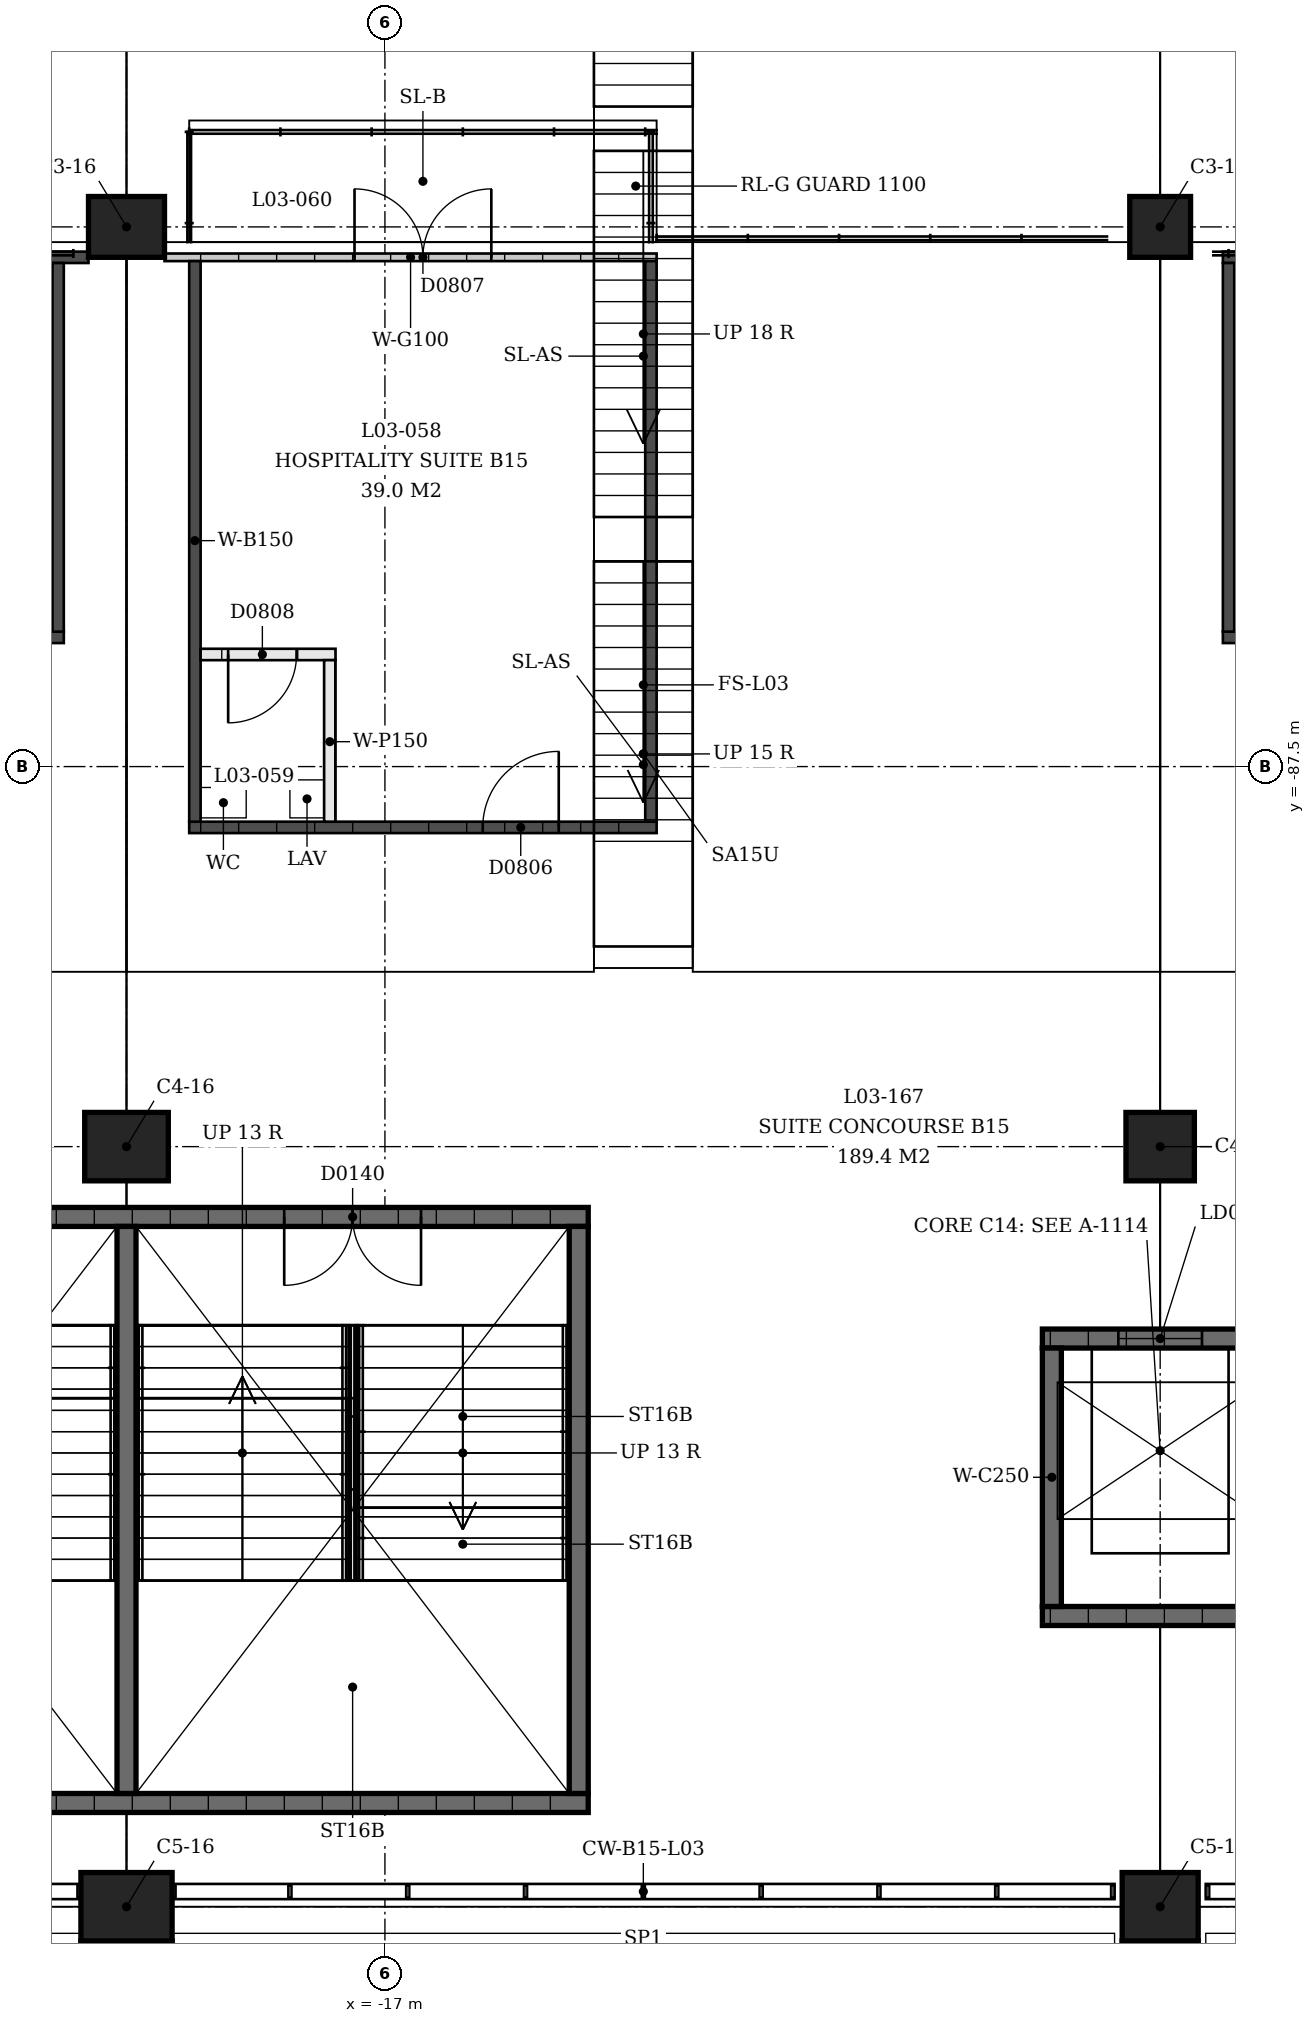
"""IFC4 building model, lengths in metres.
Left out: names, types, materials, properties, quantities, classifications, styles, units other than length and angle.
Written with IfcOpenShell. Run it as: python <this file> out.ifc"""

import sys

from ifc_helpers import new_model, si_unit, direction, frame, frame_2d, origin, origin_2d, place, context, subcontext, project, spatial, rectangle, extrude, element, fill, save


model = new_model("IFC4")
c1 = context("Model", 3, precision=1e-05, world=origin(), true_north=direction((0.0, 1.0)))
c2 = subcontext(c1, "Body", "Model", "MODEL_VIEW")
j1 = project(units=[si_unit("LENGTHUNIT", "METRE"), si_unit("PLANEANGLEUNIT", "RADIAN")], contexts=[c1])
p1 = place(None, origin())
s1 = spatial("IfcSite", under=j1, at=p1, CompositionType="ELEMENT")
p2 = place(p1, origin())
s2 = spatial("IfcBuilding", under=s1, at=p2, CompositionType="ELEMENT")
p3 = place(p2, frame((0.0, 0.0, 13.5)))
s3 = spatial("IfcBuildingStorey", under=s2, at=p3, CompositionType="ELEMENT", Elevation=13.5)
p4 = place(p3, frame((-6.8, -80.4, 0.0), z_axis=(0.0, 0.0, 1.0), x_axis=(1.0, 0.0, 0.0)))
e1 = element("IfcColumn", 1, at=p4, inside=s3, PredefinedType="COLUMN", context=c2, shape_type="SweptSolid", body=[
    extrude(rectangle(XDim=0.8, YDim=0.8, at=origin_2d()), origin(), (0.0, 0.0, 1.0), 2.033),
])
p5 = place(p3, frame((-6.8, -92.5, 0.0), z_axis=(0.0, 0.0, 1.0), x_axis=(1.0, 0.0, 0.0)))
e2 = element("IfcColumn", 2, at=p5, inside=s3, PredefinedType="COLUMN", context=c2, shape_type="SweptSolid", body=[
    extrude(rectangle(XDim=0.9, YDim=0.9, at=origin_2d()), origin(), (0.0, 0.0, 1.0), 4.5),
])
p6 = place(p3, frame((-6.8, -102.5, 0.0), z_axis=(0.0, 0.0, 1.0), x_axis=(1.0, 0.0, 0.0)))
e3 = element("IfcColumn", 3, at=p6, inside=s3, PredefinedType="COLUMN", context=c2, shape_type="SweptSolid", body=[
    extrude(rectangle(XDim=1.0, YDim=0.9, at=origin_2d()), origin(), (0.0, 0.0, 1.0), 4.5),
])
p7 = place(p3, frame((-20.4, -80.4, 0.0), z_axis=(0.0, 0.0, 1.0), x_axis=(1.0, 0.0, 0.0)))
e4 = element("IfcColumn", 4, at=p7, inside=s3, PredefinedType="COLUMN", context=c2, shape_type="SweptSolid", body=[
    extrude(rectangle(XDim=1.0, YDim=0.8, at=origin_2d()), origin(), (0.0, 0.0, 1.0), 2.033),
])
p8 = place(p3, frame((-20.4, -92.5, 0.0), z_axis=(0.0, 0.0, 1.0), x_axis=(1.0, 0.0, 0.0)))
e5 = element("IfcColumn", 5, at=p8, inside=s3, PredefinedType="COLUMN", context=c2, shape_type="SweptSolid", body=[
    extrude(rectangle(XDim=1.1, YDim=0.9, at=origin_2d()), origin(), (0.0, 0.0, 1.0), 4.5),
])
p9 = place(p3, frame((-20.4, -102.5, 0.0), z_axis=(0.0, 0.0, 1.0), x_axis=(1.0, 0.0, 0.0)))
e6 = element("IfcColumn", 6, at=p9, inside=s3, PredefinedType="COLUMN", context=c2, shape_type="SweptSolid", body=[
    extrude(rectangle(XDim=1.2, YDim=0.9, at=origin_2d()), origin(), (0.0, 0.0, 1.0), 4.5),
])
p10 = place(p3, frame((-26.475, -93.425, 0.0), z_axis=(0.0, 0.0, 1.0), x_axis=(1.0, 0.0, 0.0)))
e7 = element("IfcWall", 7, at=p10, inside=s3, PredefinedType="SHEAR", context=c2, shape_type="SweptSolid", body=[
    extrude(rectangle(XDim=12.15, YDim=0.25, at=frame_2d((6.075, 0.0))), origin(), (0.0, 0.0, 1.0), 4.09),
])
p11 = place(p10, frame((2.2, 0.0, 0.0)))
e8 = element("IfcOpeningElement", 8, at=p11, cuts=e7, PredefinedType="OPENING", context=c2, shape_type="SweptSolid", body=[
    extrude(rectangle(XDim=1.8, YDim=2.1, at=frame_2d((0.9, 1.05))), frame((0.0, 0.125, 0.0), z_axis=(0.0, -1.0, 0.0), x_axis=(1.0, 0.0, 0.0)), (0.0, 0.0, 1.0), 0.25),
])
p12 = place(p10, frame((8.15, 0.0, 0.0)))
e9 = element("IfcOpeningElement", 9, at=p12, cuts=e7, PredefinedType="OPENING", context=c2, shape_type="SweptSolid", body=[
    extrude(rectangle(XDim=1.8, YDim=2.1, at=frame_2d((0.9, 1.05))), frame((0.0, 0.125, 0.0), z_axis=(0.0, -1.0, 0.0), x_axis=(1.0, 0.0, 0.0)), (0.0, 0.0, 1.0), 0.25),
])
p13 = place(p3, frame((-26.475, -101.135, 0.0), z_axis=(0.0, 0.0, 1.0), x_axis=(1.0, 0.0, 0.0)))
e10 = element("IfcWall", 10, at=p13, inside=s3, PredefinedType="SHEAR", context=c2, shape_type="SweptSolid", body=[
    extrude(rectangle(XDim=12.15, YDim=0.25, at=frame_2d((6.075, 0.0))), origin(), (0.0, 0.0, 1.0), 4.09),
])
for number, where, z_axis, x_axis in (
    (11, (-14.45, -93.55, 0.0), (0.0, 0.0, 1.0), (0.0, -1.0, 0.0)),
    (12, (-20.4, -93.55, 0.0), (0.0, 0.0, 1.0), (0.0, -1.0, 0.0)),
):
    element("IfcWall", number, at=place(p3, frame(where, z_axis=z_axis, x_axis=x_axis)), inside=s3, PredefinedType="SHEAR", context=c2, shape_type="SweptSolid", body=[
        extrude(rectangle(XDim=7.46, YDim=0.25, at=frame_2d((3.73, 0.0))), origin(), (0.0, 0.0, 1.0), 4.09),
    ])
p14 = place(p3, frame((-8.35, -95.025, 0.0), z_axis=(0.0, 0.0, 1.0), x_axis=(1.0, 0.0, 0.0)))
e13 = element("IfcWall", 13, at=p14, inside=s3, PredefinedType="SHEAR", context=c2, shape_type="SweptSolid", body=[
    extrude(rectangle(XDim=3.1, YDim=0.25, at=frame_2d((1.55, 0.0))), origin(), (0.0, 0.0, 1.0), 4.09),
])
p15 = place(p14, frame((1.0, 0.0, 0.0)))
e14 = element("IfcOpeningElement", 14, at=p15, cuts=e13, PredefinedType="OPENING", context=c2, shape_type="SweptSolid", body=[
    extrude(rectangle(XDim=1.1, YDim=2.1, at=frame_2d((0.55, 1.05))), frame((0.0, 0.125, 0.0), z_axis=(0.0, -1.0, 0.0), x_axis=(1.0, 0.0, 0.0)), (0.0, 0.0, 1.0), 0.25),
])
p16 = place(p3, frame((-8.35, -98.675, 0.0), z_axis=(0.0, 0.0, 1.0), x_axis=(1.0, 0.0, 0.0)))
e15 = element("IfcWall", 15, at=p16, inside=s3, PredefinedType="SHEAR", context=c2, shape_type="SweptSolid", body=[
    extrude(rectangle(XDim=3.1, YDim=0.25, at=frame_2d((1.55, 0.0))), origin(), (0.0, 0.0, 1.0), 4.09),
])
p17 = place(p3, frame((-8.225, -95.15, 0.0), z_axis=(0.0, 0.0, 1.0), x_axis=(0.0, -1.0, 0.0)))
e16 = element("IfcWall", 16, at=p17, inside=s3, PredefinedType="SHEAR", context=c2, shape_type="SweptSolid", body=[
    extrude(rectangle(XDim=3.4, YDim=0.25, at=frame_2d((1.7, 0.0))), origin(), (0.0, 0.0, 1.0), 4.09),
])
p18 = place(p3, frame((6.3, -80.8, 0.0), z_axis=(0.0, 0.0, 1.0), x_axis=(-1.0, 0.0, 0.0)))
e17 = element("IfcWall", 17, at=p18, inside=s3, PredefinedType="SOLIDWALL", context=c2, shape_type="SweptSolid", body=[
    extrude(rectangle(XDim=12.275, YDim=0.15, at=frame_2d((6.138, 0.0))), origin(), (0.0, 0.0, 1.0), 3.0),
])
p19 = place(p3, frame((5.975, -85.8, 0.0), z_axis=(0.0, 0.0, 1.0), x_axis=(-1.0, 0.0, 0.0)))
e18 = element("IfcWall", 18, at=p19, inside=s3, PredefinedType="SOLIDWALL", context=c2, shape_type="SweptSolid", body=[
    extrude(rectangle(XDim=11.95, YDim=0.15, at=frame_2d((5.975, 0.0))), origin(), (0.0, 0.0, 1.0), 3.0),
])
p20 = place(p19, frame((2.525, 0.0, 0.0)))
e19 = element("IfcOpeningElement", 19, at=p20, cuts=e18, PredefinedType="OPENING", context=c2, shape_type="SweptSolid", body=[
    extrude(rectangle(XDim=1.0, YDim=2.1, at=frame_2d((0.5, 1.05))), frame((0.0, 0.075, 0.0), z_axis=(0.0, -1.0, 0.0), x_axis=(1.0, 0.0, 0.0)), (0.0, 0.0, 1.0), 0.15),
])
p21 = place(p19, frame((8.425, 0.0, 0.0)))
e20 = element("IfcOpeningElement", 20, at=p21, cuts=e18, PredefinedType="OPENING", context=c2, shape_type="SweptSolid", body=[
    extrude(rectangle(XDim=1.0, YDim=2.1, at=frame_2d((0.5, 1.05))), frame((0.0, 0.075, 0.0), z_axis=(0.0, -1.0, 0.0), x_axis=(1.0, 0.0, 0.0)), (0.0, 0.0, 1.0), 0.15),
])
p22 = place(p3, frame((-5.9, -80.875, 0.0), z_axis=(0.0, 0.0, 1.0), x_axis=(0.0, -1.0, 0.0)))
e21 = element("IfcWall", 21, at=p22, inside=s3, PredefinedType="SOLIDWALL", context=c2, shape_type="SweptSolid", body=[
    extrude(rectangle(XDim=4.85, YDim=0.15, at=frame_2d((2.425, 0.0))), origin(), (0.0, 0.0, 1.0), 3.0),
])
p23 = place(p3, frame((-19.9, -80.8, 0.0), z_axis=(0.0, 0.0, 1.0), x_axis=(1.0, 0.0, 0.0)))
e22 = element("IfcWall", 22, at=p23, inside=s3, PredefinedType="PARTITIONING", context=c2, shape_type="SweptSolid", body=[
    extrude(rectangle(XDim=6.475, YDim=0.1, at=frame_2d((3.237, 0.0))), origin(), (0.0, 0.0, 1.0), 3.0),
])
p24 = place(p23, frame((2.5, 0.0, 0.0)))
e23 = element("IfcOpeningElement", 23, at=p24, cuts=e22, PredefinedType="OPENING", context=c2, shape_type="SweptSolid", body=[
    extrude(rectangle(XDim=1.8, YDim=2.1, at=frame_2d((0.9, 1.05))), frame((0.0, 0.05, 0.0), z_axis=(0.0, -1.0, 0.0), x_axis=(1.0, 0.0, 0.0)), (0.0, 0.0, 1.0), 0.1),
])
p25 = place(p3, frame((-19.575, -88.3, 0.0), z_axis=(0.0, 0.0, 1.0), x_axis=(1.0, 0.0, 0.0)))
e24 = element("IfcWall", 24, at=p25, inside=s3, PredefinedType="SOLIDWALL", context=c2, shape_type="SweptSolid", body=[
    extrude(rectangle(XDim=6.15, YDim=0.15, at=frame_2d((3.075, 0.0))), origin(), (0.0, 0.0, 1.0), 3.0),
])
p26 = place(p25, frame((3.862, 0.0, 0.0)))
e25 = element("IfcOpeningElement", 25, at=p26, cuts=e24, PredefinedType="OPENING", context=c2, shape_type="SweptSolid", body=[
    extrude(rectangle(XDim=1.0, YDim=2.1, at=frame_2d((0.5, 1.05))), frame((0.0, 0.075, 0.0), z_axis=(0.0, -1.0, 0.0), x_axis=(1.0, 0.0, 0.0)), (0.0, 0.0, 1.0), 0.15),
])
for number, where, z_axis, x_axis in (
    (26, (-19.5, -80.85, 0.0), (0.0, 0.0, 1.0), (0.0, -1.0, 0.0)),
    (27, (-13.5, -80.85, 0.0), (0.0, 0.0, 1.0), (0.0, -1.0, 0.0)),
):
    element("IfcWall", number, at=place(p3, frame(where, z_axis=z_axis, x_axis=x_axis)), inside=s3, PredefinedType="SOLIDWALL", context=c2, shape_type="SweptSolid", body=[
        extrude(rectangle(XDim=7.375, YDim=0.15, at=frame_2d((3.688, 0.0))), origin(), (0.0, 0.0, 1.0), 3.0),
    ])
p27 = place(p3, frame((-19.425, -86.025, 0.0), z_axis=(0.0, 0.0, 1.0), x_axis=(1.0, 0.0, 0.0)))
e28 = element("IfcWall", 28, at=p27, inside=s3, PredefinedType="PARTITIONING", context=c2, shape_type="SweptSolid", body=[
    extrude(rectangle(XDim=1.775, YDim=0.15, at=frame_2d((0.888, 0.0))), origin(), (0.0, 0.0, 1.0), 3.0),
])
p28 = place(p27, frame((0.363, 0.0, 0.0)))
e29 = element("IfcOpeningElement", 29, at=p28, cuts=e28, PredefinedType="OPENING", context=c2, shape_type="SweptSolid", body=[
    extrude(rectangle(XDim=0.9, YDim=2.1, at=frame_2d((0.45, 1.05))), frame((0.0, 0.075, 0.0), z_axis=(0.0, -1.0, 0.0), x_axis=(1.0, 0.0, 0.0)), (0.0, 0.0, 1.0), 0.15),
])
p29 = place(p3, frame((-17.725, -86.1, 0.0), z_axis=(0.0, 0.0, 1.0), x_axis=(0.0, -1.0, 0.0)))
e30 = element("IfcWall", 30, at=p29, inside=s3, PredefinedType="PARTITIONING", context=c2, shape_type="SweptSolid", body=[
    extrude(rectangle(XDim=2.125, YDim=0.15, at=frame_2d((1.062, 0.0))), origin(), (0.0, 0.0, 1.0), 3.0),
])
p30 = place(p3, frame((-20.9, -80.8, 0.0), z_axis=(0.0, 0.0, 1.0), x_axis=(-1.0, 0.0, 0.0)))
e31 = element("IfcWall", 31, at=p30, inside=s3, PredefinedType="SOLIDWALL", context=c2, shape_type="SweptSolid", body=[
    extrude(rectangle(XDim=12.275, YDim=0.15, at=frame_2d((6.138, 0.0))), origin(), (0.0, 0.0, 1.0), 3.0),
])
p31 = place(p3, frame((-21.225, -85.8, 0.0), z_axis=(0.0, 0.0, 1.0), x_axis=(-1.0, 0.0, 0.0)))
e32 = element("IfcWall", 32, at=p31, inside=s3, PredefinedType="SOLIDWALL", context=c2, shape_type="SweptSolid", body=[
    extrude(rectangle(XDim=11.95, YDim=0.15, at=frame_2d((5.975, 0.0))), origin(), (0.0, 0.0, 1.0), 3.0),
])
p32 = place(p31, frame((2.525, 0.0, 0.0)))
e33 = element("IfcOpeningElement", 33, at=p32, cuts=e32, PredefinedType="OPENING", context=c2, shape_type="SweptSolid", body=[
    extrude(rectangle(XDim=1.0, YDim=2.1, at=frame_2d((0.5, 1.05))), frame((0.0, 0.075, 0.0), z_axis=(0.0, -1.0, 0.0), x_axis=(1.0, 0.0, 0.0)), (0.0, 0.0, 1.0), 0.15),
])
p33 = place(p31, frame((8.425, 0.0, 0.0)))
e34 = element("IfcOpeningElement", 34, at=p33, cuts=e32, PredefinedType="OPENING", context=c2, shape_type="SweptSolid", body=[
    extrude(rectangle(XDim=1.0, YDim=2.1, at=frame_2d((0.5, 1.05))), frame((0.0, 0.075, 0.0), z_axis=(0.0, -1.0, 0.0), x_axis=(1.0, 0.0, 0.0)), (0.0, 0.0, 1.0), 0.15),
])
p34 = place(p3, frame((-21.3, -80.875, 0.0), z_axis=(0.0, 0.0, 1.0), x_axis=(0.0, -1.0, 0.0)))
e35 = element("IfcWall", 35, at=p34, inside=s3, PredefinedType="SOLIDWALL", context=c2, shape_type="SweptSolid", body=[
    extrude(rectangle(XDim=4.85, YDim=0.15, at=frame_2d((2.425, 0.0))), origin(), (0.0, 0.0, 1.0), 3.0),
])
p35 = place(p12, origin())
e36 = element("IfcDoor", 36, at=p35, inside=s3, OperationType="DOUBLE_DOOR_SINGLE_SWING", PredefinedType="DOOR", context=c2, shape_type="SweptSolid", body=[
    extrude(rectangle(XDim=1.8, YDim=2.1, at=frame_2d((0.9, 1.05))), frame((0.0, 0.025, 0.0), z_axis=(0.0, -1.0, 0.0), x_axis=(1.0, 0.0, 0.0)), (0.0, 0.0, 1.0), 0.05),
])
fill(e9, e36)
p36 = place(p15, origin())
e37 = element("IfcDoor", 37, at=p36, inside=s3, OperationType="SLIDING_TO_LEFT", PredefinedType="DOOR", context=c2, shape_type="SweptSolid", body=[
    extrude(rectangle(XDim=1.1, YDim=2.1, at=frame_2d((0.55, 1.05))), frame((0.0, 0.025, 0.0), z_axis=(0.0, -1.0, 0.0), x_axis=(1.0, 0.0, 0.0)), (0.0, 0.0, 1.0), 0.05),
])
fill(e14, e37)
p37 = place(p26, origin())
e38 = element("IfcDoor", 38, at=p37, inside=s3, OperationType="SINGLE_SWING_LEFT", PredefinedType="DOOR", context=c2, shape_type="SweptSolid", body=[
    extrude(rectangle(XDim=1.0, YDim=2.1, at=frame_2d((0.5, 1.05))), frame((0.0, 0.025, 0.0), z_axis=(0.0, -1.0, 0.0), x_axis=(1.0, 0.0, 0.0)), (0.0, 0.0, 1.0), 0.05),
])
fill(e25, e38)
p38 = place(p24, origin())
e39 = element("IfcDoor", 39, at=p38, inside=s3, OperationType="DOUBLE_DOOR_SINGLE_SWING", PredefinedType="DOOR", context=c2, shape_type="SweptSolid", body=[
    extrude(rectangle(XDim=1.8, YDim=2.1, at=frame_2d((0.9, 1.05))), frame((0.0, 0.025, 0.0), z_axis=(0.0, -1.0, 0.0), x_axis=(1.0, 0.0, 0.0)), (0.0, 0.0, 1.0), 0.05),
])
fill(e23, e39)
p39 = place(p28, origin())
e40 = element("IfcDoor", 40, at=p39, inside=s3, OperationType="SINGLE_SWING_LEFT", PredefinedType="DOOR", context=c2, shape_type="SweptSolid", body=[
    extrude(rectangle(XDim=0.9, YDim=2.1, at=frame_2d((0.45, 1.05))), frame((0.0, 0.025, 0.0), z_axis=(0.0, -1.0, 0.0), x_axis=(1.0, 0.0, 0.0)), (0.0, 0.0, 1.0), 0.05),
])
fill(e29, e40)
save(model, sys.argv[1])
